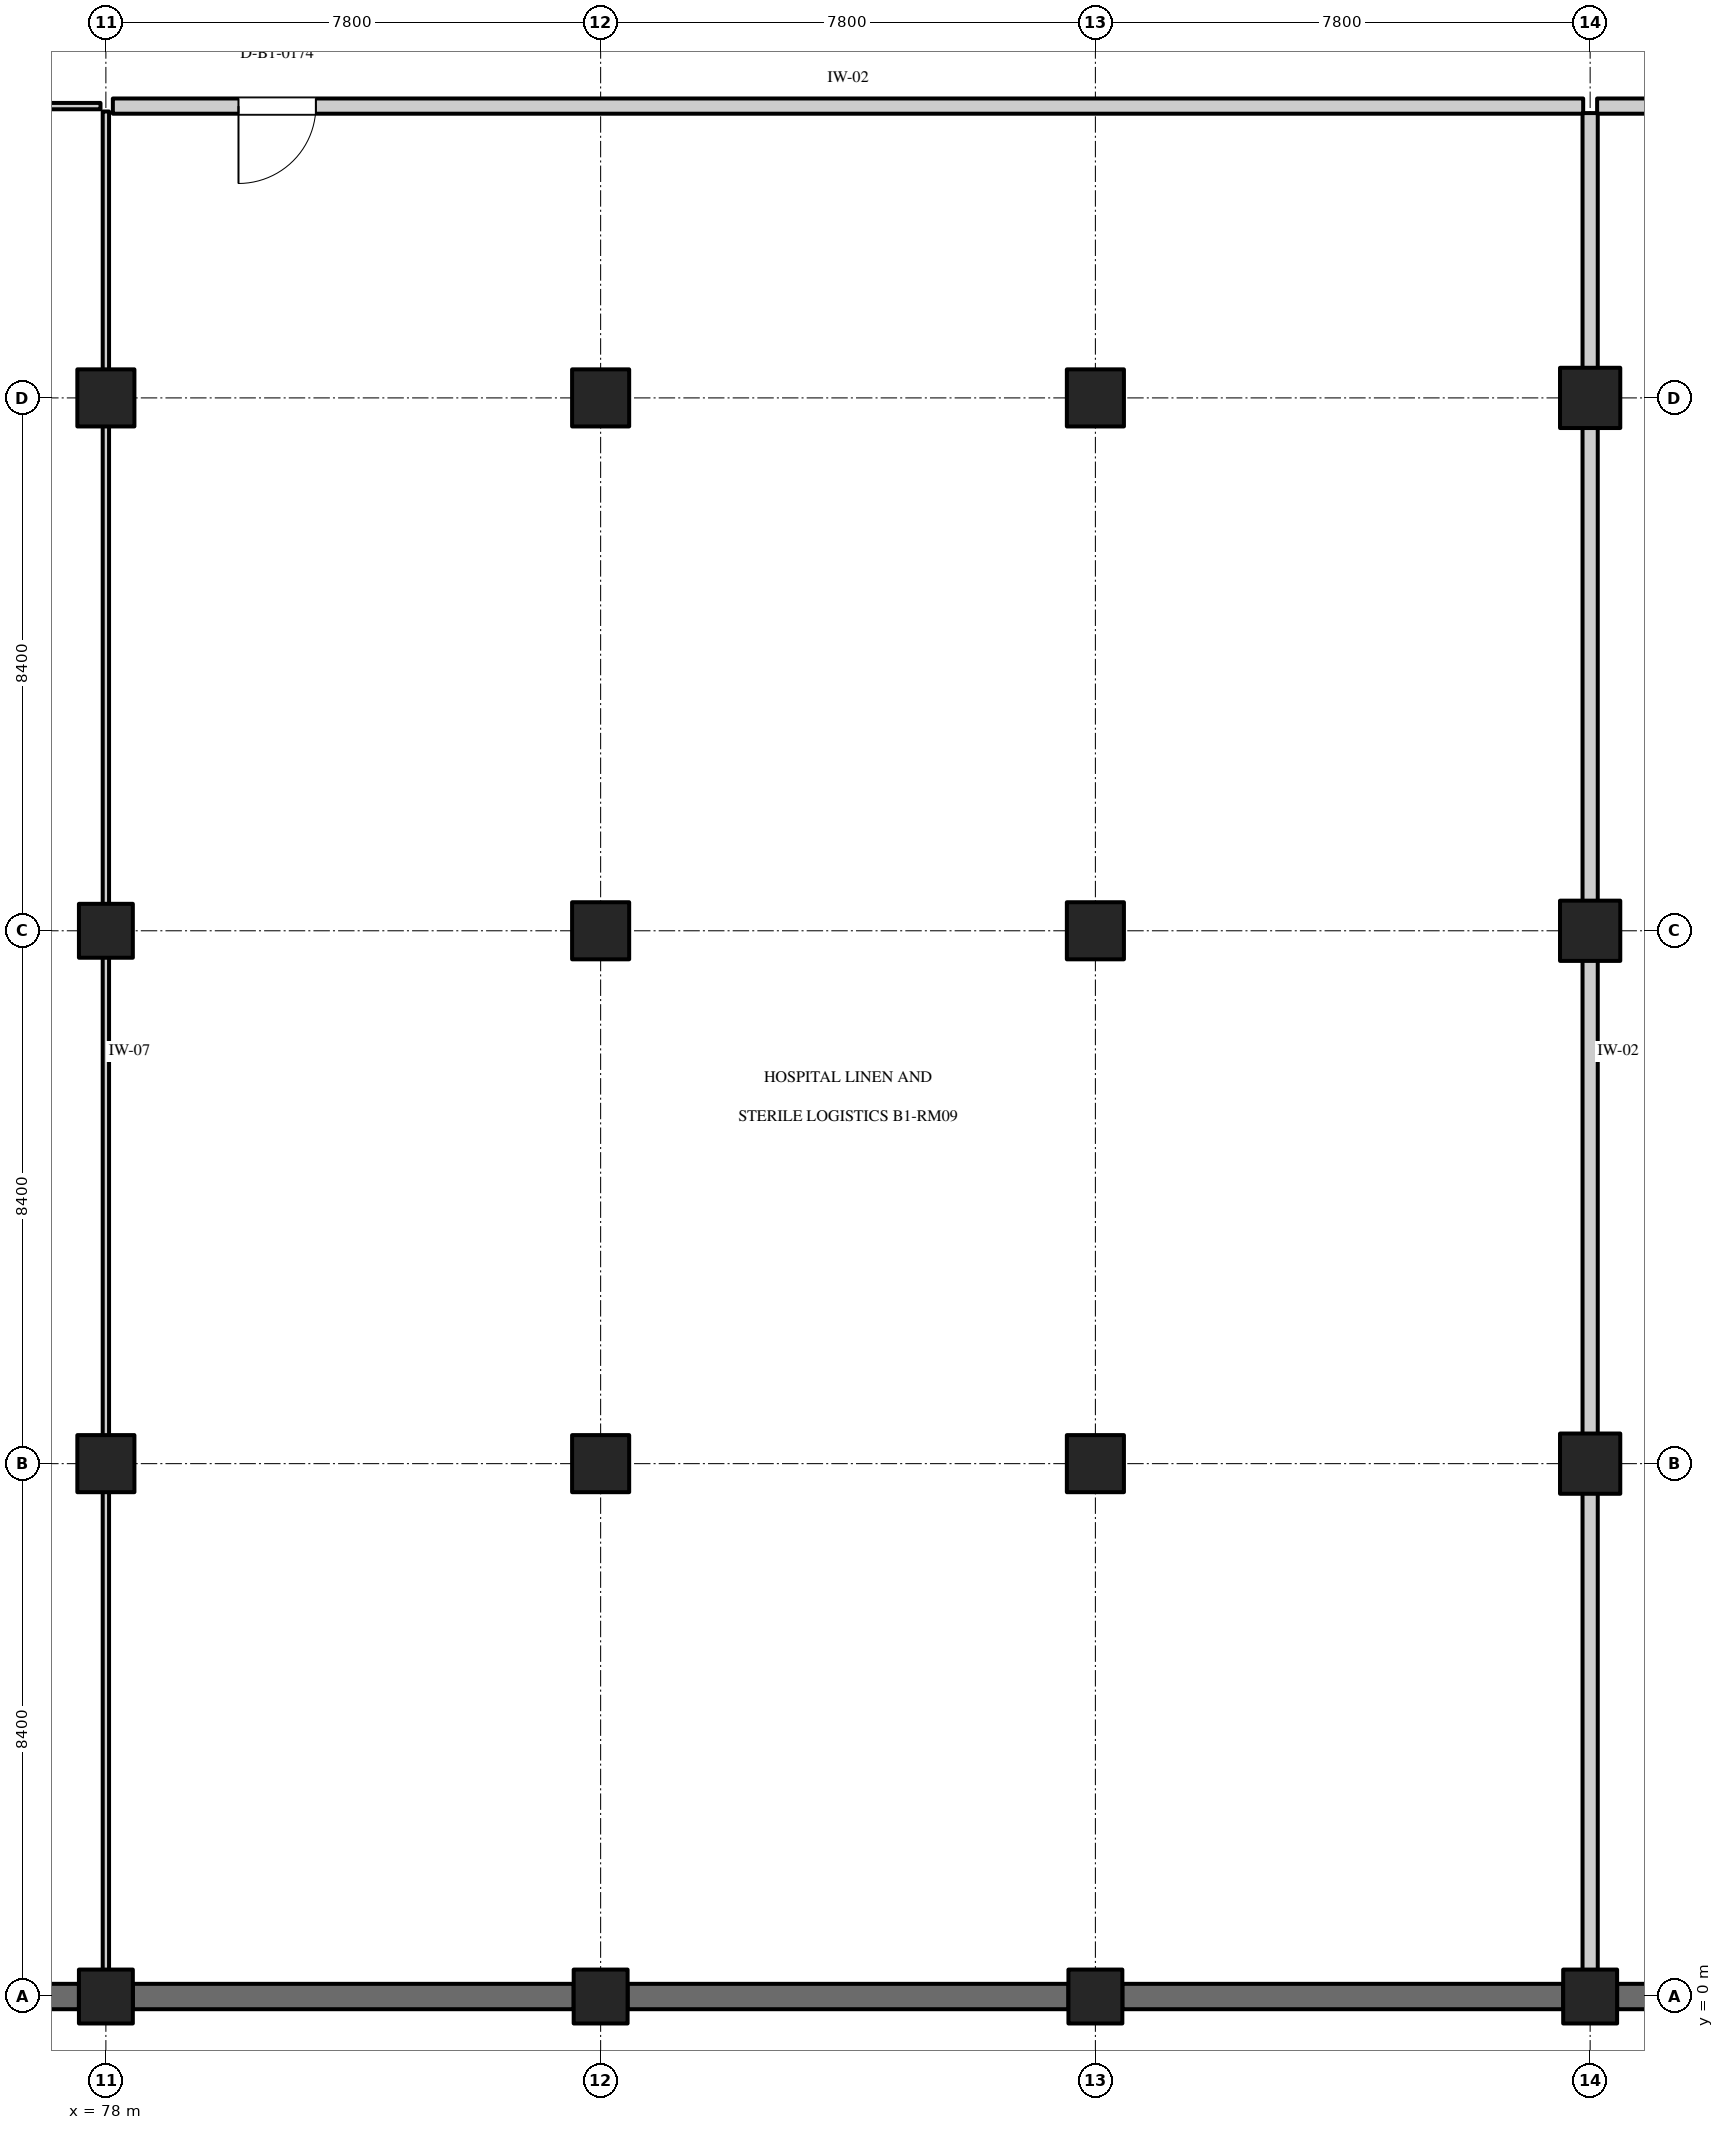
"""IFC4 building model, lengths in metres.
Left out: names, types, materials, properties, quantities, classifications, styles, units other than length and angle.
Written with IfcOpenShell. Run it as: python <this file> out.ifc"""

import sys

from ifc_helpers import new_model, si_unit, direction, frame, frame_2d, origin, origin_2d, place, context, subcontext, project, spatial, rectangle, circle, extrude, element, fill, save


model = new_model("IFC4")
c1 = context("Model", 3, precision=1e-05, world=origin(), true_north=direction((0.0, 1.0)))
c2 = subcontext(c1, "Body", "Model", "MODEL_VIEW")
j1 = project(units=[si_unit("LENGTHUNIT", "METRE"), si_unit("PLANEANGLEUNIT", "RADIAN")], contexts=[c1])
p1 = place(None, origin())
s1 = spatial("IfcSite", under=j1, at=p1, CompositionType="ELEMENT")
p2 = place(p1, origin())
s2 = spatial("IfcBuilding", under=s1, at=p2, CompositionType="ELEMENT")
p3 = place(p2, frame((0.0, 0.0, -4.5)))
s3 = spatial("IfcBuildingStorey", under=s2, at=p3, CompositionType="ELEMENT", Elevation=-4.5)
p4 = place(p3, frame((78.0, 0.0, 0.0), z_axis=(0.0, 0.0, 1.0), x_axis=(1.0, 0.0, 0.0)))
e1 = element("IfcColumn", 1, at=p4, inside=s3, PredefinedType="COLUMN", context=c2, shape_type="SweptSolid", body=[
    extrude(circle(Radius=0.425, at=origin_2d()), origin(), (0.0, 0.0, 1.0), 4.5),
])
p5 = place(p3, frame((78.0, 8.4, 0.0), z_axis=(0.0, 0.0, 1.0), x_axis=(1.0, 0.0, 0.0)))
e2 = element("IfcColumn", 2, at=p5, inside=s3, PredefinedType="COLUMN", context=c2, shape_type="SweptSolid", body=[
    extrude(rectangle(XDim=0.9, YDim=0.9, at=origin_2d()), origin(), (0.0, 0.0, 1.0), 4.5),
])
p6 = place(p3, frame((78.0, 16.8, 0.0), z_axis=(0.0, 0.0, 1.0), x_axis=(1.0, 0.0, 0.0)))
e3 = element("IfcColumn", 3, at=p6, inside=s3, PredefinedType="COLUMN", context=c2, shape_type="SweptSolid", body=[
    extrude(circle(Radius=0.425, at=origin_2d()), origin(), (0.0, 0.0, 1.0), 4.5),
])
p7 = place(p3, frame((78.0, 25.2, 0.0), z_axis=(0.0, 0.0, 1.0), x_axis=(1.0, 0.0, 0.0)))
e4 = element("IfcColumn", 4, at=p7, inside=s3, PredefinedType="COLUMN", context=c2, shape_type="SweptSolid", body=[
    extrude(rectangle(XDim=0.9, YDim=0.9, at=origin_2d()), origin(), (0.0, 0.0, 1.0), 4.5),
])
p8 = place(p3, frame((85.8, 0.0, 0.0), z_axis=(0.0, 0.0, 1.0), x_axis=(1.0, 0.0, 0.0)))
e5 = element("IfcColumn", 5, at=p8, inside=s3, PredefinedType="COLUMN", context=c2, shape_type="SweptSolid", body=[
    extrude(circle(Radius=0.425, at=origin_2d()), origin(), (0.0, 0.0, 1.0), 4.5),
])
for number, where, z_axis, x_axis in (
    (6, (85.8, 8.4, 0.0), (0.0, 0.0, 1.0), (1.0, 0.0, 0.0)),
    (7, (85.8, 16.8, 0.0), (0.0, 0.0, 1.0), (1.0, 0.0, 0.0)),
    (8, (85.8, 25.2, 0.0), (0.0, 0.0, 1.0), (1.0, 0.0, 0.0)),
):
    element("IfcColumn", number, at=place(p3, frame(where, z_axis=z_axis, x_axis=x_axis)), inside=s3, PredefinedType="COLUMN", context=c2, shape_type="SweptSolid", body=[
        extrude(rectangle(XDim=0.9, YDim=0.9, at=origin_2d()), origin(), (0.0, 0.0, 1.0), 4.5),
    ])
p9 = place(p3, frame((93.6, 0.0, 0.0), z_axis=(0.0, 0.0, 1.0), x_axis=(1.0, 0.0, 0.0)))
e9 = element("IfcColumn", 9, at=p9, inside=s3, PredefinedType="COLUMN", context=c2, shape_type="SweptSolid", body=[
    extrude(circle(Radius=0.425, at=origin_2d()), origin(), (0.0, 0.0, 1.0), 4.5),
])
for number, where, z_axis, x_axis in (
    (10, (93.6, 8.4, 0.0), (0.0, 0.0, 1.0), (1.0, 0.0, 0.0)),
    (11, (93.6, 16.8, 0.0), (0.0, 0.0, 1.0), (1.0, 0.0, 0.0)),
    (12, (93.6, 25.2, 0.0), (0.0, 0.0, 1.0), (1.0, 0.0, 0.0)),
):
    element("IfcColumn", number, at=place(p3, frame(where, z_axis=z_axis, x_axis=x_axis)), inside=s3, PredefinedType="COLUMN", context=c2, shape_type="SweptSolid", body=[
        extrude(rectangle(XDim=0.9, YDim=0.9, at=origin_2d()), origin(), (0.0, 0.0, 1.0), 4.5),
    ])
p10 = place(p3, frame((101.4, 0.0, 0.0), z_axis=(0.0, 0.0, 1.0), x_axis=(1.0, 0.0, 0.0)))
e13 = element("IfcColumn", 13, at=p10, inside=s3, PredefinedType="COLUMN", context=c2, shape_type="SweptSolid", body=[
    extrude(circle(Radius=0.425, at=origin_2d()), origin(), (0.0, 0.0, 1.0), 4.5),
])
for number, where, z_axis, x_axis in (
    (14, (101.4, 8.4, 0.0), (0.0, 0.0, 1.0), (1.0, 0.0, 0.0)),
    (15, (101.4, 16.8, 0.0), (0.0, 0.0, 1.0), (1.0, 0.0, 0.0)),
    (16, (101.4, 25.2, 0.0), (0.0, 0.0, 1.0), (1.0, 0.0, 0.0)),
):
    element("IfcColumn", number, at=place(p3, frame(where, z_axis=z_axis, x_axis=x_axis)), inside=s3, PredefinedType="COLUMN", context=c2, shape_type="SweptSolid", body=[
        extrude(rectangle(XDim=0.95, YDim=0.95, at=origin_2d()), origin(), (0.0, 0.0, 1.0), 4.5),
    ])
for number, where, z_axis, x_axis in (
    (17, (70.625, 0.0, 0.0), (0.0, 0.0, 1.0), (1.0, 0.0, 0.0)),
    (18, (78.425, 0.0, 0.0), (0.0, 0.0, 1.0), (1.0, 0.0, 0.0)),
    (19, (86.225, 0.0, 0.0), (0.0, 0.0, 1.0), (1.0, 0.0, 0.0)),
):
    element("IfcWall", number, at=place(p3, frame(where, z_axis=z_axis, x_axis=x_axis)), inside=s3, PredefinedType="SOLIDWALL", context=c2, shape_type="SweptSolid", body=[
        extrude(rectangle(XDim=6.95, YDim=0.4, at=frame_2d((3.475, 0.0))), origin(), (0.0, 0.0, 1.0), 3.45),
    ])
p11 = place(p3, frame((94.025, 0.0, 0.0), z_axis=(0.0, 0.0, 1.0), x_axis=(1.0, 0.0, 0.0)))
e20 = element("IfcWall", 20, at=p11, inside=s3, PredefinedType="SOLIDWALL", context=c2, shape_type="SweptSolid", body=[
    extrude(rectangle(XDim=6.95, YDim=0.4, at=frame_2d((3.475, 0.0))), origin(), (0.0, 0.0, 1.0), 3.45),
])
p12 = place(p3, frame((101.825, 0.0, 0.0), z_axis=(0.0, 0.0, 1.0), x_axis=(1.0, 0.0, 0.0)))
e21 = element("IfcWall", 21, at=p12, inside=s3, PredefinedType="SOLIDWALL", context=c2, shape_type="SweptSolid", body=[
    extrude(rectangle(XDim=6.9, YDim=0.4, at=frame_2d((3.45, 0.0))), origin(), (0.0, 0.0, 1.0), 3.45),
])
p13 = place(p3, frame((54.685, 29.8, 0.0), z_axis=(0.0, 0.0, 1.0), x_axis=(1.0, 0.0, 0.0)))
e22 = element("IfcWall", 22, at=p13, inside=s3, PredefinedType="PARTITIONING", context=c2, shape_type="SweptSolid", body=[
    extrude(rectangle(XDim=23.23, YDim=0.1, at=frame_2d((11.615, 0.0))), origin(), (0.0, 0.0, 1.0), 4.13),
])
p14 = place(p13, frame((1.988, 0.0, 0.0)))
e23 = element("IfcOpeningElement", 23, at=p14, cuts=e22, PredefinedType="OPENING", context=c2, shape_type="SweptSolid", body=[
    extrude(rectangle(XDim=1.12, YDim=2.2, at=frame_2d((0.56, 1.1))), frame((0.0, 0.062, 0.0), z_axis=(0.0, -1.0, 0.0), x_axis=(1.0, 0.0, 0.0)), (0.0, 0.0, 1.0), 0.124),
])
p15 = place(p3, frame((78.0, 0.085, 0.0), z_axis=(0.0, 0.0, 1.0), x_axis=(0.0, 1.0, 0.0)))
e24 = element("IfcWall", 24, at=p15, inside=s3, PredefinedType="PARTITIONING", context=c2, shape_type="SweptSolid", body=[
    extrude(rectangle(XDim=29.63, YDim=0.1, at=frame_2d((14.815, 0.0))), origin(), (0.0, 0.0, 1.0), 3.4),
])
p16 = place(p3, frame((78.11, 29.8, 0.0), z_axis=(0.0, 0.0, 1.0), x_axis=(1.0, 0.0, 0.0)))
e25 = element("IfcWall", 25, at=p16, inside=s3, PredefinedType="STANDARD", context=c2, shape_type="SweptSolid", body=[
    extrude(rectangle(XDim=23.18, YDim=0.24, at=frame_2d((11.59, 0.0))), origin(), (0.0, 0.0, 1.0), 4.13),
])
p17 = place(p16, frame((1.981, 0.0, 0.0)))
e26 = element("IfcOpeningElement", 26, at=p17, cuts=e25, PredefinedType="OPENING", context=c2, shape_type="SweptSolid", body=[
    extrude(rectangle(XDim=1.22, YDim=2.15, at=frame_2d((0.61, 1.075))), frame((0.0, 0.132, 0.0), z_axis=(0.0, -1.0, 0.0), x_axis=(1.0, 0.0, 0.0)), (0.0, 0.0, 1.0), 0.264),
])
for number, where, z_axis, x_axis in (
    (27, (85.415, 0.0, 0.0), (0.0, 0.0, 1.0), (1.0, 0.0, 0.0)),
    (28, (93.215, 0.0, 0.0), (0.0, 0.0, 1.0), (1.0, 0.0, 0.0)),
):
    element("IfcWall", number, at=place(p3, frame(where, z_axis=z_axis, x_axis=x_axis)), inside=s3, PredefinedType="STANDARD", context=c2, shape_type="SweptSolid", body=[
        extrude(rectangle(XDim=0.77, YDim=0.24, at=frame_2d((0.385, 0.0))), origin(), (0.0, 0.0, 1.0), 3.4),
    ])
p18 = place(p3, frame((101.4, 0.11, 0.0), z_axis=(0.0, 0.0, 1.0), x_axis=(0.0, 1.0, 0.0)))
e29 = element("IfcWall", 29, at=p18, inside=s3, PredefinedType="STANDARD", context=c2, shape_type="SweptSolid", body=[
    extrude(rectangle(XDim=29.58, YDim=0.24, at=frame_2d((14.79, 0.0))), origin(), (0.0, 0.0, 1.0), 3.4),
])
p19 = place(p3, frame((101.51, 29.8, 0.0), z_axis=(0.0, 0.0, 1.0), x_axis=(1.0, 0.0, 0.0)))
e30 = element("IfcWall", 30, at=p19, inside=s3, PredefinedType="STANDARD", context=c2, shape_type="SweptSolid", body=[
    extrude(rectangle(XDim=34.78, YDim=0.24, at=frame_2d((17.39, 0.0))), origin(), (0.0, 0.0, 1.0), 4.13),
])
p20 = place(p19, frame((1.986, 0.0, 0.0)))
e31 = element("IfcOpeningElement", 31, at=p20, cuts=e30, PredefinedType="OPENING", context=c2, shape_type="SweptSolid", body=[
    extrude(rectangle(XDim=1.65, YDim=2.25, at=frame_2d((0.825, 1.125))), frame((0.0, 0.132, 0.0), z_axis=(0.0, -1.0, 0.0), x_axis=(1.0, 0.0, 0.0)), (0.0, 0.0, 1.0), 0.264),
])
p21 = place(p17, frame((1.22, 0.0, 0.0), z_axis=(0.0, 0.0, 1.0), x_axis=(-1.0, 0.0, 0.0)))
e32 = element("IfcDoor", 32, at=p21, inside=s3, OperationType="SINGLE_SWING_RIGHT", PredefinedType="DOOR", context=c2, shape_type="SweptSolid", body=[
    extrude(rectangle(XDim=1.22, YDim=2.15, at=frame_2d((0.61, 1.075))), frame((0.0, 0.025, 0.0), z_axis=(0.0, -1.0, 0.0), x_axis=(1.0, 0.0, 0.0)), (0.0, 0.0, 1.0), 0.05),
])
fill(e26, e32)
save(model, sys.argv[1])
